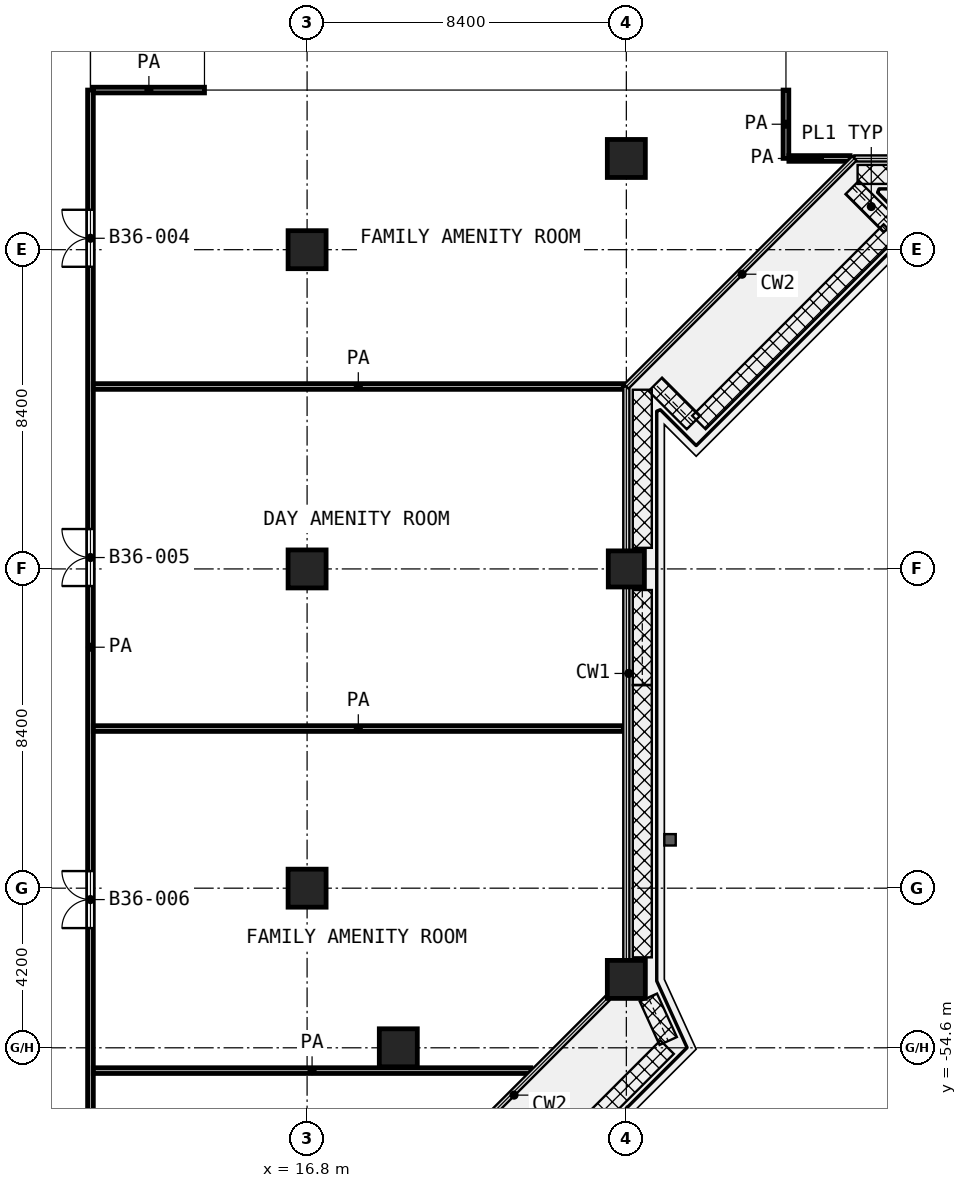
"""IFC4 building model, lengths in metres.
Left out: names, types, materials, properties, quantities, classifications, styles, units other than length and angle.
Written with IfcOpenShell. Run it as: python <this file> out.ifc"""

import sys

from ifc_helpers import new_model, si_unit, direction, frame, frame_2d, origin, origin_2d, place, context, subcontext, project, spatial, rectangle, extrude, element, fill, save


model = new_model("IFC4")
c1 = context("Model", 3, precision=1e-05, world=origin(), true_north=direction((0.0, 1.0)))
c2 = subcontext(c1, "Body", "Model", "MODEL_VIEW")
j1 = project(units=[si_unit("LENGTHUNIT", "METRE"), si_unit("PLANEANGLEUNIT", "RADIAN")], contexts=[c1])
p1 = place(None, origin())
s1 = spatial("IfcSite", under=j1, at=p1, CompositionType="ELEMENT")
p2 = place(p1, origin())
s2 = spatial("IfcBuilding", under=s1, at=p2, CompositionType="ELEMENT")
p3 = place(p2, frame((0.0, 0.0, 158.4)))
s3 = spatial("IfcBuildingStorey", under=s2, at=p3, CompositionType="ELEMENT", Elevation=158.4)
for number, where, z_axis, x_axis in (
    (1, (25.2, -31.2, 0.0), (0.0, 0.0, 1.0), (1.0, 0.0, 0.0)),
    (2, (16.8, -33.6, 0.0), (0.0, 0.0, 1.0), (1.0, 0.0, 0.0)),
    (3, (16.8, -42.0, 0.0), (0.0, 0.0, 1.0), (1.0, 0.0, 0.0)),
):
    element("IfcColumn", number, at=place(p3, frame(where, z_axis=z_axis, x_axis=x_axis)), inside=s3, PredefinedType="COLUMN", context=c2, shape_type="SweptSolid", body=[
        extrude(rectangle(XDim=1.0, YDim=1.0, at=origin_2d()), origin(), (0.0, 0.0, 1.0), 4.2),
    ])
p4 = place(p3, frame((25.2, -42.0, 0.0), z_axis=(0.0, 0.0, 1.0), x_axis=(1.0, 0.0, 0.0)))
e4 = element("IfcColumn", 4, at=p4, inside=s3, PredefinedType="COLUMN", context=c2, shape_type="SweptSolid", body=[
    extrude(rectangle(XDim=0.95, YDim=0.95, at=origin_2d()), origin(), (0.0, 0.0, 1.0), 4.2),
])
for number, where, z_axis, x_axis in (
    (5, (16.8, -50.4, 0.0), (0.0, 0.0, 1.0), (1.0, 0.0, 0.0)),
    (6, (25.2, -52.8, 0.0), (0.0, 0.0, 1.0), (1.0, 0.0, 0.0)),
    (7, (19.2, -54.6, 0.0), (0.0, 0.0, 1.0), (1.0, 0.0, 0.0)),
):
    element("IfcColumn", number, at=place(p3, frame(where, z_axis=z_axis, x_axis=x_axis)), inside=s3, PredefinedType="COLUMN", context=c2, shape_type="SweptSolid", body=[
        extrude(rectangle(XDim=1.0, YDim=1.0, at=origin_2d()), origin(), (0.0, 0.0, 1.0), 4.2),
    ])
p5 = place(p3, frame((11.175, -55.2, 0.0), z_axis=(0.0, 0.0, 1.0), x_axis=(1.0, 0.0, 0.0)))
e8 = element("IfcWall", 8, at=p5, inside=s3, PredefinedType="PARTITIONING", context=c2, shape_type="SweptSolid", body=[
    extrude(rectangle(XDim=11.512, YDim=0.15, at=frame_2d((5.756, 0.0))), origin(), (0.0, 0.0, 1.0), 3.6),
])
for number, where, z_axis, x_axis in (
    (9, (11.175, -46.2, 0.0), (0.0, 0.0, 1.0), (1.0, 0.0, 0.0)),
    (10, (11.175, -37.2, 0.0), (0.0, 0.0, 1.0), (1.0, 0.0, 0.0)),
):
    element("IfcWall", number, at=place(p3, frame(where, z_axis=z_axis, x_axis=x_axis)), inside=s3, PredefinedType="PARTITIONING", context=c2, shape_type="SweptSolid", body=[
        extrude(rectangle(XDim=13.945, YDim=0.15, at=frame_2d((6.973, 0.0))), origin(), (0.0, 0.0, 1.0), 3.6),
    ])
p6 = place(p3, frame((29.477, -31.2, 0.0), z_axis=(0.0, 0.0, 1.0), x_axis=(1.0, 0.0, 0.0)))
e11 = element("IfcWall", 11, at=p6, inside=s3, PredefinedType="PARTITIONING", context=c2, shape_type="SweptSolid", body=[
    extrude(rectangle(XDim=1.61, YDim=0.15, at=frame_2d((0.805, 0.0))), origin(), (0.0, 0.0, 1.0), 3.6),
])
p7 = place(p3, frame((11.175, -29.4, 0.0), z_axis=(0.0, 0.0, 1.0), x_axis=(1.0, 0.0, 0.0)))
e12 = element("IfcWall", 12, at=p7, inside=s3, PredefinedType="PARTITIONING", context=c2, shape_type="SweptSolid", body=[
    extrude(rectangle(XDim=2.925, YDim=0.15, at=frame_2d((1.462, 0.0))), origin(), (0.0, 0.0, 1.0), 3.6),
])
p8 = place(p3, frame((11.1, -58.72, 0.0), z_axis=(0.0, 0.0, 1.0), x_axis=(0.0, 1.0, 0.0)))
e13 = element("IfcWall", 13, at=p8, inside=s3, PredefinedType="PARTITIONING", context=c2, shape_type="SweptSolid", body=[
    extrude(rectangle(XDim=29.32, YDim=0.15, at=frame_2d((14.66, 0.0))), origin(), (0.0, 0.0, 1.0), 3.6),
])
p9 = place(p8, frame((24.67, 0.0, 0.0)))
e14 = element("IfcOpeningElement", 14, at=p9, cuts=e13, PredefinedType="OPENING", context=c2, shape_type="SweptSolid", body=[
    extrude(rectangle(XDim=1.5, YDim=2.1, at=frame_2d((0.75, 1.05))), frame((0.0, 0.085, 0.0), z_axis=(0.0, -1.0, 0.0), x_axis=(1.0, 0.0, 0.0)), (0.0, 0.0, 1.0), 0.17),
])
p10 = place(p8, frame((16.27, 0.0, 0.0)))
e15 = element("IfcOpeningElement", 15, at=p10, cuts=e13, PredefinedType="OPENING", context=c2, shape_type="SweptSolid", body=[
    extrude(rectangle(XDim=1.5, YDim=2.1, at=frame_2d((0.75, 1.05))), frame((0.0, 0.085, 0.0), z_axis=(0.0, -1.0, 0.0), x_axis=(1.0, 0.0, 0.0)), (0.0, 0.0, 1.0), 0.17),
])
p11 = place(p8, frame((7.27, 0.0, 0.0)))
e16 = element("IfcOpeningElement", 16, at=p11, cuts=e13, PredefinedType="OPENING", context=c2, shape_type="SweptSolid", body=[
    extrude(rectangle(XDim=1.5, YDim=2.1, at=frame_2d((0.75, 1.05))), frame((0.0, 0.085, 0.0), z_axis=(0.0, -1.0, 0.0), x_axis=(1.0, 0.0, 0.0)), (0.0, 0.0, 1.0), 0.17),
])
p12 = place(p8, frame((1.22, 0.0, 0.0)))
e17 = element("IfcOpeningElement", 17, at=p12, cuts=e13, PredefinedType="OPENING", context=c2, shape_type="SweptSolid", body=[
    extrude(rectangle(XDim=1.0, YDim=2.1, at=frame_2d((0.5, 1.05))), frame((0.0, 0.085, 0.0), z_axis=(0.0, -1.0, 0.0), x_axis=(1.0, 0.0, 0.0)), (0.0, 0.0, 1.0), 0.17),
])
p13 = place(p3, frame((29.4, -31.198, 0.0), z_axis=(0.0, 0.0, 1.0), x_axis=(0.0, 1.0, 0.0)))
e18 = element("IfcWall", 18, at=p13, inside=s3, PredefinedType="PARTITIONING", context=c2, shape_type="SweptSolid", body=[
    extrude(rectangle(XDim=1.798, YDim=0.15, at=frame_2d((0.899, 0.0))), origin(), (0.0, 0.0, 1.0), 3.6),
])
p14 = place(p9, origin())
e19 = element("IfcDoor", 19, at=p14, inside=s3, OperationType="DOUBLE_DOOR_SINGLE_SWING", PredefinedType="DOOR", context=c2, shape_type="SweptSolid", body=[
    extrude(rectangle(XDim=1.5, YDim=2.1, at=frame_2d((0.75, 1.05))), frame((0.0, 0.025, 0.0), z_axis=(0.0, -1.0, 0.0), x_axis=(1.0, 0.0, 0.0)), (0.0, 0.0, 1.0), 0.05),
])
fill(e14, e19)
p15 = place(p10, origin())
e20 = element("IfcDoor", 20, at=p15, inside=s3, OperationType="DOUBLE_DOOR_SINGLE_SWING", PredefinedType="DOOR", context=c2, shape_type="SweptSolid", body=[
    extrude(rectangle(XDim=1.5, YDim=2.1, at=frame_2d((0.75, 1.05))), frame((0.0, 0.025, 0.0), z_axis=(0.0, -1.0, 0.0), x_axis=(1.0, 0.0, 0.0)), (0.0, 0.0, 1.0), 0.05),
])
fill(e15, e20)
p16 = place(p11, origin())
e21 = element("IfcDoor", 21, at=p16, inside=s3, OperationType="DOUBLE_DOOR_SINGLE_SWING", PredefinedType="DOOR", context=c2, shape_type="SweptSolid", body=[
    extrude(rectangle(XDim=1.5, YDim=2.1, at=frame_2d((0.75, 1.05))), frame((0.0, 0.025, 0.0), z_axis=(0.0, -1.0, 0.0), x_axis=(1.0, 0.0, 0.0)), (0.0, 0.0, 1.0), 0.05),
])
fill(e16, e21)
save(model, sys.argv[1])
